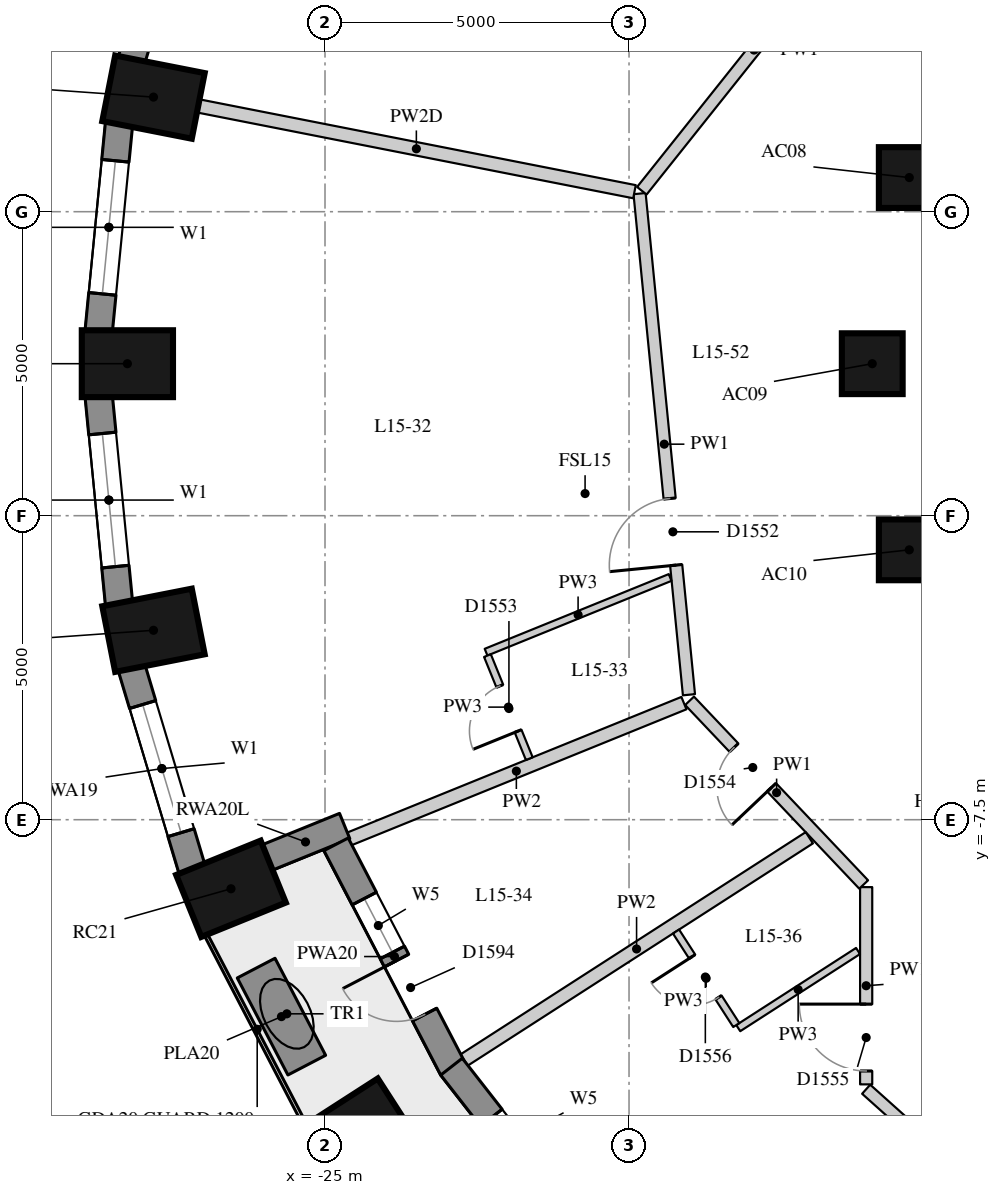
"""IFC4 building model, lengths in metres.
Left out: names, types, materials, properties, quantities, classifications, styles, units other than length and angle.
Written with IfcOpenShell. Run it as: python <this file> out.ifc"""

import sys

from ifc_helpers import new_model, si_unit, direction, frame, frame_2d, origin, origin_2d, place, context, subcontext, project, spatial, rectangle, extrude, element, fill, save


model = new_model("IFC4")
c1 = context("Model", 3, precision=1e-05, world=origin(), true_north=direction((0.0, 1.0)))
c2 = subcontext(c1, "Body", "Model", "MODEL_VIEW")
j1 = project(units=[si_unit("LENGTHUNIT", "METRE"), si_unit("PLANEANGLEUNIT", "RADIAN")], contexts=[c1])
p1 = place(None, origin())
s1 = spatial("IfcSite", under=j1, at=p1, CompositionType="ELEMENT")
p2 = place(p1, origin())
s2 = spatial("IfcBuilding", under=s1, at=p2, CompositionType="ELEMENT")
p3 = place(p2, frame((0.0, 0.0, 58.0)))
s3 = spatial("IfcBuildingStorey", under=s2, at=p3, CompositionType="ELEMENT", Elevation=58.0)
for number, where, z_axis, x_axis in (
    (1, (-27.821, 4.385, 0.0), (0.0, 0.0, 1.0), (-0.981, 0.193, 0.0)),
    (2, (-28.25, 0.0, 0.0), (0.0, 0.0, 1.0), (-1.0, 0.0, 0.0)),
    (3, (-27.821, -4.385, 0.0), (0.0, 0.0, 1.0), (-0.981, -0.193, 0.0)),
    (4, (-26.546, -8.636, 0.0), (0.0, 0.0, 1.0), (-0.927, -0.376, 0.0)),
    (5, (-24.465, -12.625, 0.0), (0.0, 0.0, 1.0), (-0.841, -0.541, 0.0)),
):
    element("IfcColumn", number, at=place(p3, frame(where, z_axis=z_axis, x_axis=x_axis)), inside=s3, PredefinedType="COLUMN", context=c2, shape_type="SweptSolid", body=[
        extrude(rectangle(XDim=1.5, YDim=1.1, at=origin_2d()), origin(), (0.0, 0.0, 1.0), 3.3),
    ])
for number, where, z_axis, x_axis in (
    (6, (-15.391, 3.062, 0.0), (0.0, 0.0, 1.0), (1.0, 0.0, 0.0)),
    (7, (-16.0, 0.0, 0.0), (0.0, 0.0, 1.0), (1.0, 0.0, 0.0)),
    (8, (-15.391, -3.062, 0.0), (0.0, 0.0, 1.0), (1.0, 0.0, 0.0)),
):
    element("IfcColumn", number, at=place(p3, frame(where, z_axis=z_axis, x_axis=x_axis)), inside=s3, PredefinedType="COLUMN", context=c2, shape_type="SweptSolid", body=[
        extrude(rectangle(XDim=1.0, YDim=1.0, at=origin_2d()), origin(), (0.0, 0.0, 1.0), 3.3),
    ])
p4 = place(p3, frame((-27.185, 8.323, 0.0), z_axis=(0.0, 0.0, 1.0), x_axis=(-0.287064133733, -0.957911364963, 0.0)))
e9 = element("IfcWall", 9, at=p4, inside=s3, PredefinedType="SOLIDWALL", context=c2, shape_type="SweptSolid", body=[
    extrude(rectangle(XDim=3.473, YDim=0.45, at=frame_2d((1.737, 0.0))), origin(), (0.0, 0.0, 1.0), 3.02),
])
p5 = place(p4, frame((0.637, 0.0, 0.4)))
e10 = element("IfcOpeningElement", 10, at=p5, cuts=e9, PredefinedType="OPENING", context=c2, shape_type="SweptSolid", body=[
    extrude(rectangle(XDim=2.2, YDim=1.75, at=frame_2d((1.1, 0.875))), frame((0.0, 0.235, 0.0), z_axis=(0.0, -1.0, 0.0), x_axis=(1.0, 0.0, 0.0)), (0.0, 0.0, 1.0), 0.47),
])
p6 = place(p3, frame((-28.387, 3.956, 0.0), z_axis=(0.0, 0.0, 1.0), x_axis=(-0.097389581596, -0.995246336038, 0.0)))
e11 = element("IfcWall", 11, at=p6, inside=s3, PredefinedType="SOLIDWALL", context=c2, shape_type="SweptSolid", body=[
    extrude(rectangle(XDim=3.442, YDim=0.45, at=frame_2d((1.721, 0.0))), origin(), (0.0, 0.0, 1.0), 3.02),
])
p7 = place(p6, frame((0.621, 0.0, 0.4)))
e12 = element("IfcOpeningElement", 12, at=p7, cuts=e11, PredefinedType="OPENING", context=c2, shape_type="SweptSolid", body=[
    extrude(rectangle(XDim=2.2, YDim=1.75, at=frame_2d((1.1, 0.875))), frame((0.0, 0.235, 0.0), z_axis=(0.0, -1.0, 0.0), x_axis=(1.0, 0.0, 0.0)), (0.0, 0.0, 1.0), 0.47),
])
p8 = place(p3, frame((-28.722, -0.53, 0.0), z_axis=(0.0, 0.0, 1.0), x_axis=(0.097389581596, -0.995246336038, 0.0)))
e13 = element("IfcWall", 13, at=p8, inside=s3, PredefinedType="SOLIDWALL", context=c2, shape_type="SweptSolid", body=[
    extrude(rectangle(XDim=3.442, YDim=0.45, at=frame_2d((1.721, 0.0))), origin(), (0.0, 0.0, 1.0), 3.02),
])
p9 = place(p8, frame((0.621, 0.0, 0.4)))
e14 = element("IfcOpeningElement", 14, at=p9, cuts=e13, PredefinedType="OPENING", context=c2, shape_type="SweptSolid", body=[
    extrude(rectangle(XDim=2.2, YDim=1.75, at=frame_2d((1.1, 0.875))), frame((0.0, 0.235, 0.0), z_axis=(0.0, -1.0, 0.0), x_axis=(1.0, 0.0, 0.0)), (0.0, 0.0, 1.0), 0.47),
])
p10 = place(p3, frame((-28.182, -4.996, 0.0), z_axis=(0.0, 0.0, 1.0), x_axis=(0.287064133733, -0.957911364963, 0.0)))
e15 = element("IfcWall", 15, at=p10, inside=s3, PredefinedType="SOLIDWALL", context=c2, shape_type="SweptSolid", body=[
    extrude(rectangle(XDim=3.473, YDim=0.45, at=frame_2d((1.737, 0.0))), origin(), (0.0, 0.0, 1.0), 3.02),
])
p11 = place(p10, frame((0.637, 0.0, 0.4)))
e16 = element("IfcOpeningElement", 16, at=p11, cuts=e15, PredefinedType="OPENING", context=c2, shape_type="SweptSolid", body=[
    extrude(rectangle(XDim=2.2, YDim=1.75, at=frame_2d((1.1, 0.875))), frame((0.0, 0.235, 0.0), z_axis=(0.0, -1.0, 0.0), x_axis=(1.0, 0.0, 0.0)), (0.0, 0.0, 1.0), 0.47),
])
p12 = place(p3, frame((-25.965, -8.127, 0.0), z_axis=(0.0, 0.0, 1.0), x_axis=(0.926575599743, 0.376108572039, 0.0)))
e17 = element("IfcWall", 17, at=p12, inside=s3, PredefinedType="SOLIDWALL", context=c2, shape_type="SweptSolid", body=[
    extrude(rectangle(XDim=1.39, YDim=0.45, at=frame_2d((0.695, 0.0))), origin(), (0.0, 0.0, 1.0), 3.02),
])
p13 = place(p3, frame((-24.818, -7.905, 0.0), z_axis=(0.0, 0.0, 1.0), x_axis=(0.461517123562, -0.887131300687, 0.0)))
e18 = element("IfcWall", 18, at=p13, inside=s3, PredefinedType="SOLIDWALL", context=c2, shape_type="SweptSolid", body=[
    extrude(rectangle(XDim=4.162, YDim=0.45, at=frame_2d((2.081, 0.0))), origin(), (0.0, 0.0, 1.0), 3.02),
])
p14 = place(p13, frame((1.006, 0.0, 0.4)))
e19 = element("IfcOpeningElement", 19, at=p14, cuts=e18, PredefinedType="OPENING", context=c2, shape_type="SweptSolid", body=[
    extrude(rectangle(XDim=1.0, YDim=1.75, at=frame_2d((0.5, 0.875))), frame((0.0, 0.235, 0.0), z_axis=(0.0, -1.0, 0.0), x_axis=(1.0, 0.0, 0.0)), (0.0, 0.0, 1.0), 0.47),
])
p15 = place(p13, frame((2.156, 0.0, 0.0)))
e20 = element("IfcOpeningElement", 20, at=p15, cuts=e18, PredefinedType="OPENING", context=c2, shape_type="SweptSolid", body=[
    extrude(rectangle(XDim=1.0, YDim=2.15, at=frame_2d((0.5, 1.075))), frame((0.0, 0.235, 0.0), z_axis=(0.0, -1.0, 0.0), x_axis=(1.0, 0.0, 0.0)), (0.0, 0.0, 1.0), 0.47),
])
p16 = place(p3, frame((-22.92, -11.562, 0.0), z_axis=(0.0, 0.0, 1.0), x_axis=(0.615586464456, -0.788069352772, 0.0)))
e21 = element("IfcWall", 21, at=p16, inside=s3, PredefinedType="SOLIDWALL", context=c2, shape_type="SweptSolid", body=[
    extrude(rectangle(XDim=4.279, YDim=0.45, at=frame_2d((2.139, 0.0))), origin(), (0.0, 0.0, 1.0), 3.02),
])
p17 = place(p16, frame((1.064, 0.0, 0.4)))
e22 = element("IfcOpeningElement", 22, at=p17, cuts=e21, PredefinedType="OPENING", context=c2, shape_type="SweptSolid", body=[
    extrude(rectangle(XDim=1.0, YDim=1.75, at=frame_2d((0.5, 0.875))), frame((0.0, 0.235, 0.0), z_axis=(0.0, -1.0, 0.0), x_axis=(1.0, 0.0, 0.0)), (0.0, 0.0, 1.0), 0.47),
])
p18 = place(p16, frame((2.214, 0.0, 0.0)))
e23 = element("IfcOpeningElement", 23, at=p18, cuts=e21, PredefinedType="OPENING", context=c2, shape_type="SweptSolid", body=[
    extrude(rectangle(XDim=1.0, YDim=2.15, at=frame_2d((0.5, 1.075))), frame((0.0, 0.235, 0.0), z_axis=(0.0, -1.0, 0.0), x_axis=(1.0, 0.0, 0.0)), (0.0, 0.0, 1.0), 0.47),
])
p19 = place(p3, frame((-26.133, -9.941, 0.0), z_axis=(0.0, 0.0, 1.0), x_axis=(0.462501112253, -0.886618701114, 0.0)))
e24 = element("IfcWall", 24, at=p19, inside=s3, PredefinedType="USERDEFINED", context=c2, shape_type="SweptSolid", body=[
    extrude(rectangle(XDim=1.8, YDim=0.7, at=frame_2d((0.9, 0.0))), origin(), (0.0, 0.0, 1.0), 0.75),
])
p20 = place(p3, frame((-14.559, -13.314, 0.0), z_axis=(0.0, 0.0, 1.0), x_axis=(-0.744636171002, 0.667470578254, 0.0)))
e25 = element("IfcWall", 25, at=p20, inside=s3, PredefinedType="PARTITIONING", context=c2, shape_type="SweptSolid", body=[
    extrude(rectangle(XDim=2.069, YDim=0.2, at=frame_2d((1.035, 0.0))), origin(), (0.0, 0.0, 1.0), 3.02),
])
p21 = place(p3, frame((-16.1, -11.853, 0.0), z_axis=(0.0, 0.0, 1.0), x_axis=(0.0, 1.0, 0.0)))
e26 = element("IfcWall", 26, at=p21, inside=s3, PredefinedType="PARTITIONING", context=c2, shape_type="SweptSolid", body=[
    extrude(rectangle(XDim=3.244, YDim=0.2, at=frame_2d((1.622, 0.0))), origin(), (0.0, 0.0, 1.0), 3.02),
])
p22 = place(p21, frame((0.22, 0.0, 0.0)))
e27 = element("IfcOpeningElement", 27, at=p22, cuts=e26, PredefinedType="OPENING", context=c2, shape_type="SweptSolid", body=[
    extrude(rectangle(XDim=1.1, YDim=2.1, at=frame_2d((0.55, 1.05))), frame((0.0, 0.11, 0.0), z_axis=(0.0, -1.0, 0.0), x_axis=(1.0, 0.0, 0.0)), (0.0, 0.0, 1.0), 0.22),
])
p23 = place(p3, frame((-16.141, -8.566, 0.0), z_axis=(0.0, 0.0, 1.0), x_axis=(-0.687938220375, 0.725769250483, 0.0)))
e28 = element("IfcWall", 28, at=p23, inside=s3, PredefinedType="PARTITIONING", context=c2, shape_type="SweptSolid", body=[
    extrude(rectangle(XDim=4.162, YDim=0.2, at=frame_2d((2.081, 0.0))), origin(), (0.0, 0.0, 1.0), 3.02),
])
p24 = place(p23, frame((2.201, 0.0, 0.0)))
e29 = element("IfcOpeningElement", 29, at=p24, cuts=e28, PredefinedType="OPENING", context=c2, shape_type="SweptSolid", body=[
    extrude(rectangle(XDim=0.9, YDim=2.1, at=frame_2d((0.45, 1.05))), frame((0.0, 0.11, 0.0), z_axis=(0.0, -1.0, 0.0), x_axis=(1.0, 0.0, 0.0)), (0.0, 0.0, 1.0), 0.22),
])
p25 = place(p3, frame((-19.014, -5.445, 0.0), z_axis=(0.0, 0.0, 1.0), x_axis=(-0.098076369896, 0.995178891289, 0.0)))
e30 = element("IfcWall", 30, at=p25, inside=s3, PredefinedType="PARTITIONING", context=c2, shape_type="SweptSolid", body=[
    extrude(rectangle(XDim=8.282, YDim=0.2, at=frame_2d((4.141, 0.0))), origin(), (0.0, 0.0, 1.0), 3.02),
])
p26 = place(p25, frame((2.142, 0.0, 0.0)))
e31 = element("IfcOpeningElement", 31, at=p26, cuts=e30, PredefinedType="OPENING", context=c2, shape_type="SweptSolid", body=[
    extrude(rectangle(XDim=1.1, YDim=2.1, at=frame_2d((0.55, 1.05))), frame((0.0, 0.11, 0.0), z_axis=(0.0, -1.0, 0.0), x_axis=(1.0, 0.0, 0.0)), (0.0, 0.0, 1.0), 0.22),
])
p27 = place(p3, frame((-19.789, 2.844, 0.0), z_axis=(0.0, 0.0, 1.0), x_axis=(0.623300670662, 0.781982272147, 0.0)))
e32 = element("IfcWall", 32, at=p27, inside=s3, PredefinedType="PARTITIONING", context=c2, shape_type="SweptSolid", body=[
    extrude(rectangle(XDim=5.919, YDim=0.2, at=frame_2d((2.959, 0.0))), origin(), (0.0, 0.0, 1.0), 3.02),
])
p28 = place(p27, frame((4.599, 0.0, 0.0)))
e33 = element("IfcOpeningElement", 33, at=p28, cuts=e32, PredefinedType="OPENING", context=c2, shape_type="SweptSolid", body=[
    extrude(rectangle(XDim=1.1, YDim=2.1, at=frame_2d((0.55, 1.05))), frame((0.0, 0.11, 0.0), z_axis=(0.0, -1.0, 0.0), x_axis=(1.0, 0.0, 0.0)), (0.0, 0.0, 1.0), 0.22),
])
p29 = place(p3, frame((-27.085, 4.24, 0.0), z_axis=(0.0, 0.0, 1.0), x_axis=(0.981202333999, -0.192981811981, 0.0)))
e34 = element("IfcWall", 34, at=p29, inside=s3, PredefinedType="PARTITIONING", context=c2, shape_type="SweptSolid", body=[
    extrude(rectangle(XDim=7.312, YDim=0.22, at=frame_2d((3.656, 0.0))), origin(), (0.0, 0.0, 1.0), 2.47),
])
p30 = place(p3, frame((-24.609, -7.82, 0.0), z_axis=(0.0, 0.0, 1.0), x_axis=(0.926562262773, 0.376141427131, 0.0)))
e35 = element("IfcWall", 35, at=p30, inside=s3, PredefinedType="PARTITIONING", context=c2, shape_type="SweptSolid", body=[
    extrude(rectangle(XDim=5.948, YDim=0.22, at=frame_2d((2.974, 0.0))), origin(), (0.0, 0.0, 1.0), 3.02),
])
p31 = place(p3, frame((-22.717, -11.456, 0.0), z_axis=(0.0, 0.0, 1.0), x_axis=(0.840775666807, 0.541383669965, 0.0)))
e36 = element("IfcWall", 36, at=p31, inside=s3, PredefinedType="PARTITIONING", context=c2, shape_type="SweptSolid", body=[
    extrude(rectangle(XDim=6.759, YDim=0.22, at=frame_2d((3.379, 0.0))), origin(), (0.0, 0.0, 1.0), 3.02),
])
p32 = place(p3, frame((-19.324, -3.516, 0.0), z_axis=(0.0, 0.0, 1.0), x_axis=(-0.926573216048, -0.376114444421, 0.0)))
e37 = element("IfcWall", 37, at=p32, inside=s3, PredefinedType="PARTITIONING", context=c2, shape_type="SweptSolid", body=[
    extrude(rectangle(XDim=3.267, YDim=0.12, at=frame_2d((1.634, 0.0))), origin(), (0.0, 0.0, 1.0), 3.02),
])
p33 = place(p3, frame((-16.234, -9.66, 0.0), z_axis=(0.0, 0.0, 1.0), x_axis=(-0.840731269954, -0.541452612628, 0.0)))
e38 = element("IfcWall", 38, at=p33, inside=s3, PredefinedType="PARTITIONING", context=c2, shape_type="SweptSolid", body=[
    extrude(rectangle(XDim=2.343, YDim=0.12, at=frame_2d((1.171, 0.0))), origin(), (0.0, 0.0, 1.0), 3.02),
])
p34 = place(p3, frame((-22.329, -4.801, 0.0), z_axis=(0.0, 0.0, 1.0), x_axis=(0.376101474088, -0.926578480858, 0.0)))
e39 = element("IfcWall", 39, at=p34, inside=s3, PredefinedType="PARTITIONING", context=c2, shape_type="SweptSolid", body=[
    extrude(rectangle(XDim=1.83, YDim=0.12, at=frame_2d((0.915, 0.0))), origin(), (0.0, 0.0, 1.0), 3.02),
])
p35 = place(p34, frame((0.54, 0.0, 0.0)))
e40 = element("IfcOpeningElement", 40, at=p35, cuts=e39, PredefinedType="OPENING", context=c2, shape_type="SweptSolid", body=[
    extrude(rectangle(XDim=0.8, YDim=2.1, at=frame_2d((0.4, 1.05))), frame((0.0, 0.07, 0.0), z_axis=(0.0, -1.0, 0.0), x_axis=(1.0, 0.0, 0.0)), (0.0, 0.0, 1.0), 0.14),
])
p36 = place(p3, frame((-18.236, -10.878, 0.0), z_axis=(0.0, 0.0, 1.0), x_axis=(-0.54164058606, 0.840610180484, 0.0)))
e41 = element("IfcWall", 41, at=p36, inside=s3, PredefinedType="PARTITIONING", context=c2, shape_type="SweptSolid", body=[
    extrude(rectangle(XDim=1.83, YDim=0.12, at=frame_2d((0.915, 0.0))), origin(), (0.0, 0.0, 1.0), 3.02),
])
p37 = place(p36, frame((0.54, 0.0, 0.0)))
e42 = element("IfcOpeningElement", 42, at=p37, cuts=e41, PredefinedType="OPENING", context=c2, shape_type="SweptSolid", body=[
    extrude(rectangle(XDim=0.8, YDim=2.1, at=frame_2d((0.4, 1.05))), frame((0.0, 0.07, 0.0), z_axis=(0.0, -1.0, 0.0), x_axis=(1.0, 0.0, 0.0)), (0.0, 0.0, 1.0), 0.14),
])
p38 = place(p7, origin())
e43 = element("IfcWindow", 43, at=p38, inside=s3, PartitioningType="SINGLE_PANEL", PredefinedType="WINDOW", context=c2, shape_type="SweptSolid", body=[
    extrude(rectangle(XDim=2.2, YDim=1.75, at=frame_2d((1.1, 0.875))), frame((0.0, 0.035, 0.0), z_axis=(0.0, -1.0, 0.0), x_axis=(1.0, 0.0, 0.0)), (0.0, 0.0, 1.0), 0.06),
])
fill(e12, e43)
p39 = place(p9, origin())
e44 = element("IfcWindow", 44, at=p39, inside=s3, PartitioningType="SINGLE_PANEL", PredefinedType="WINDOW", context=c2, shape_type="SweptSolid", body=[
    extrude(rectangle(XDim=2.2, YDim=1.75, at=frame_2d((1.1, 0.875))), frame((0.0, 0.035, 0.0), z_axis=(0.0, -1.0, 0.0), x_axis=(1.0, 0.0, 0.0)), (0.0, 0.0, 1.0), 0.06),
])
fill(e14, e44)
p40 = place(p11, origin())
e45 = element("IfcWindow", 45, at=p40, inside=s3, PartitioningType="SINGLE_PANEL", PredefinedType="WINDOW", context=c2, shape_type="SweptSolid", body=[
    extrude(rectangle(XDim=2.2, YDim=1.75, at=frame_2d((1.1, 0.875))), frame((0.0, 0.035, 0.0), z_axis=(0.0, -1.0, 0.0), x_axis=(1.0, 0.0, 0.0)), (0.0, 0.0, 1.0), 0.06),
])
fill(e16, e45)
p41 = place(p14, origin())
e46 = element("IfcWindow", 46, at=p41, inside=s3, PartitioningType="SINGLE_PANEL", PredefinedType="WINDOW", context=c2, shape_type="SweptSolid", body=[
    extrude(rectangle(XDim=1.0, YDim=1.75, at=frame_2d((0.5, 0.875))), frame((0.0, 0.035, 0.0), z_axis=(0.0, -1.0, 0.0), x_axis=(1.0, 0.0, 0.0)), (0.0, 0.0, 1.0), 0.06),
])
fill(e19, e46)
p42 = place(p15, frame((1.0, 0.0, 0.0), z_axis=(0.0, 0.0, 1.0), x_axis=(-1.0, 0.0, 0.0)))
e47 = element("IfcDoor", 47, at=p42, inside=s3, OperationType="SINGLE_SWING_RIGHT", PredefinedType="DOOR", context=c2, shape_type="SweptSolid", body=[
    extrude(rectangle(XDim=1.0, YDim=2.15, at=frame_2d((0.5, 1.075))), frame((0.0, 0.075, 0.0), z_axis=(0.0, -1.0, 0.0), x_axis=(1.0, 0.0, 0.0)), (0.0, 0.0, 1.0), 0.05),
])
fill(e20, e47)
p43 = place(p26, origin())
e48 = element("IfcDoor", 48, at=p43, inside=s3, OperationType="SINGLE_SWING_LEFT", PredefinedType="DOOR", context=c2, shape_type="SweptSolid", body=[
    extrude(rectangle(XDim=1.1, YDim=2.1, at=frame_2d((0.55, 1.05))), frame((0.0, 0.025, 0.0), z_axis=(0.0, -1.0, 0.0), x_axis=(1.0, 0.0, 0.0)), (0.0, 0.0, 1.0), 0.05),
])
fill(e31, e48)
p44 = place(p35, origin())
e49 = element("IfcDoor", 49, at=p44, inside=s3, OperationType="SINGLE_SWING_LEFT", PredefinedType="DOOR", context=c2, shape_type="SweptSolid", body=[
    extrude(rectangle(XDim=0.8, YDim=2.1, at=frame_2d((0.4, 1.05))), frame((0.0, 0.025, 0.0), z_axis=(0.0, -1.0, 0.0), x_axis=(1.0, 0.0, 0.0)), (0.0, 0.0, 1.0), 0.05),
])
fill(e40, e49)
p45 = place(p24, origin())
e50 = element("IfcDoor", 50, at=p45, inside=s3, OperationType="SINGLE_SWING_LEFT", PredefinedType="DOOR", context=c2, shape_type="SweptSolid", body=[
    extrude(rectangle(XDim=0.9, YDim=2.1, at=frame_2d((0.45, 1.05))), frame((0.0, 0.025, 0.0), z_axis=(0.0, -1.0, 0.0), x_axis=(1.0, 0.0, 0.0)), (0.0, 0.0, 1.0), 0.05),
])
fill(e29, e50)
p46 = place(p22, origin())
e51 = element("IfcDoor", 51, at=p46, inside=s3, OperationType="SINGLE_SWING_RIGHT", PredefinedType="DOOR", context=c2, shape_type="SweptSolid", body=[
    extrude(rectangle(XDim=1.1, YDim=2.1, at=frame_2d((0.55, 1.05))), frame((0.0, 0.025, 0.0), z_axis=(0.0, -1.0, 0.0), x_axis=(1.0, 0.0, 0.0)), (0.0, 0.0, 1.0), 0.05),
])
fill(e27, e51)
p47 = place(p37, origin())
e52 = element("IfcDoor", 52, at=p47, inside=s3, OperationType="SINGLE_SWING_RIGHT", PredefinedType="DOOR", context=c2, shape_type="SweptSolid", body=[
    extrude(rectangle(XDim=0.8, YDim=2.1, at=frame_2d((0.4, 1.05))), frame((0.0, 0.025, 0.0), z_axis=(0.0, -1.0, 0.0), x_axis=(1.0, 0.0, 0.0)), (0.0, 0.0, 1.0), 0.05),
])
fill(e42, e52)
save(model, sys.argv[1])
